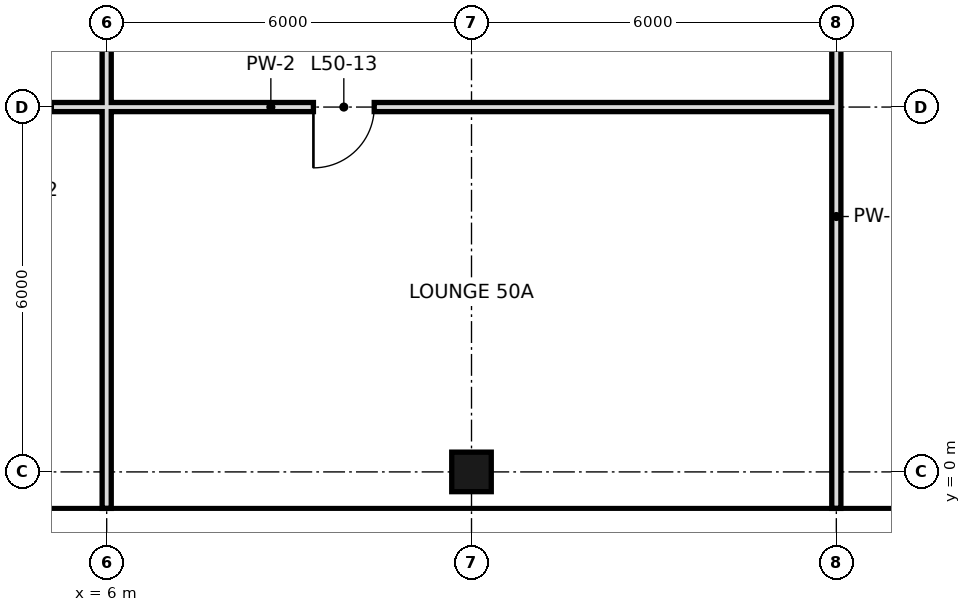
"""IFC4 building model, lengths in metres.
Left out: names, types, materials, properties, quantities, classifications, styles, units other than length and angle.
Written with IfcOpenShell. Run it as: python <this file> out.ifc"""

import sys

from ifc_helpers import new_model, si_unit, direction, frame, frame_2d, origin, origin_2d, place, context, subcontext, project, spatial, rectangle, hollow_rectangle, extrude, element, fill, save


model = new_model("IFC4")
c1 = context("Model", 3, precision=1e-05, world=origin(), true_north=direction((0.0, 1.0)))
c2 = subcontext(c1, "Body", "Model", "MODEL_VIEW")
j1 = project(units=[si_unit("LENGTHUNIT", "METRE"), si_unit("PLANEANGLEUNIT", "RADIAN")], contexts=[c1])
p1 = place(None, origin())
s1 = spatial("IfcSite", under=j1, at=p1, CompositionType="ELEMENT")
p2 = place(p1, origin())
s2 = spatial("IfcBuilding", under=s1, at=p2, CompositionType="ELEMENT")
p3 = place(p2, frame((0.0, 0.0, 215.4)))
s3 = spatial("IfcBuildingStorey", under=s2, at=p3, CompositionType="ELEMENT", Elevation=215.4)
p4 = place(p3, frame((12.0, 0.0, 0.0), z_axis=(0.0, 0.0, 1.0), x_axis=(1.0, 0.0, 0.0)))
e1 = element("IfcColumn", 1, at=p4, inside=s3, PredefinedType="COLUMN", context=c2, shape_type="SweptSolid", body=[
    extrude(hollow_rectangle(XDim=0.65, YDim=0.65, WallThickness=0.032, at=origin_2d()), origin(), (0.0, 0.0, 1.0), 3.6),
])
p5 = place(p3, frame((18.0, -0.6, 0.0), z_axis=(0.0, 0.0, 1.0), x_axis=(0.0, 1.0, 0.0)))
e2 = element("IfcWall", 2, at=p5, inside=s3, PredefinedType="PARTITIONING", context=c2, shape_type="SweptSolid", body=[
    extrude(rectangle(XDim=9.6, YDim=0.15, at=frame_2d((4.8, 0.0))), origin(), (0.0, 0.0, 1.0), 2.72),
])
p6 = place(p3, frame((6.0, -0.6, 0.0), z_axis=(0.0, 0.0, 1.0), x_axis=(0.0, 1.0, 0.0)))
e3 = element("IfcWall", 3, at=p6, inside=s3, PredefinedType="PARTITIONING", context=c2, shape_type="SweptSolid", body=[
    extrude(rectangle(XDim=6.6, YDim=0.15, at=frame_2d((3.3, 0.0))), origin(), (0.0, 0.0, 1.0), 2.72),
])
p7 = place(p3, frame((6.0, 6.0, 0.0), z_axis=(0.0, 0.0, 1.0), x_axis=(0.0, 1.0, 0.0)))
e4 = element("IfcWall", 4, at=p7, inside=s3, PredefinedType="PARTITIONING", context=c2, shape_type="SweptSolid", body=[
    extrude(rectangle(XDim=3.0, YDim=0.15, at=frame_2d((1.5, 0.0))), origin(), (0.0, 0.0, 1.0), 2.72),
])
p8 = place(p3, frame((6.0, 6.0, 0.0), z_axis=(0.0, 0.0, 1.0), x_axis=(1.0, 0.0, 0.0)))
e5 = element("IfcWall", 5, at=p8, inside=s3, PredefinedType="PARTITIONING", context=c2, shape_type="SweptSolid", body=[
    extrude(rectangle(XDim=12.0, YDim=0.15, at=frame_2d((6.0, 0.0))), origin(), (0.0, 0.0, 1.0), 2.97),
])
p9 = place(p8, frame((3.4, 0.0, 0.0)))
e6 = element("IfcOpeningElement", 6, at=p9, cuts=e5, PredefinedType="OPENING", context=c2, shape_type="SweptSolid", body=[
    extrude(rectangle(XDim=1.0, YDim=2.4, at=frame_2d((0.5, 1.2))), frame((0.0, 0.085, 0.0), z_axis=(0.0, -1.0, 0.0), x_axis=(1.0, 0.0, 0.0)), (0.0, 0.0, 1.0), 0.17),
])
p10 = place(p3, frame((2.4, 6.0, 0.0), z_axis=(0.0, 0.0, 1.0), x_axis=(1.0, 0.0, 0.0)))
e7 = element("IfcWall", 7, at=p10, inside=s3, PredefinedType="PARTITIONING", context=c2, shape_type="SweptSolid", body=[
    extrude(rectangle(XDim=3.6, YDim=0.15, at=frame_2d((1.8, 0.0))), origin(), (0.0, 0.0, 1.0), 2.97),
])
p11 = place(p10, frame((1.79, 0.0, 0.0)))
e8 = element("IfcOpeningElement", 8, at=p11, cuts=e7, PredefinedType="OPENING", context=c2, shape_type="SweptSolid", body=[
    extrude(rectangle(XDim=0.9, YDim=2.4, at=frame_2d((0.45, 1.2))), frame((0.0, 0.085, 0.0), z_axis=(0.0, -1.0, 0.0), x_axis=(1.0, 0.0, 0.0)), (0.0, 0.0, 1.0), 0.17),
])
p12 = place(p9, frame((1.0, 0.0, 0.0), z_axis=(0.0, 0.0, 1.0), x_axis=(-1.0, 0.0, 0.0)))
e9 = element("IfcDoor", 9, at=p12, inside=s3, OperationType="SINGLE_SWING_RIGHT", PredefinedType="DOOR", context=c2, shape_type="SweptSolid", body=[
    extrude(rectangle(XDim=1.0, YDim=2.4, at=frame_2d((0.5, 1.2))), frame((0.0, 0.025, 0.0), z_axis=(0.0, -1.0, 0.0), x_axis=(1.0, 0.0, 0.0)), (0.0, 0.0, 1.0), 0.05),
])
fill(e6, e9)
save(model, sys.argv[1])
